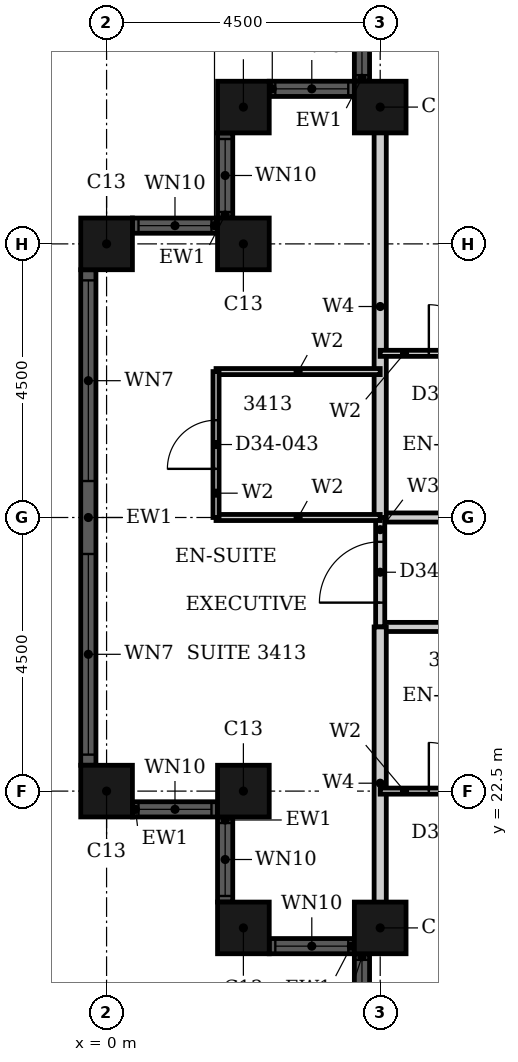
"""IFC4 building model, lengths in metres.
Left out: names, types, materials, properties, quantities, classifications, styles, units other than length and angle.
Written with IfcOpenShell. Run it as: python <this file> out.ifc"""

import sys

from ifc_helpers import new_model, si_unit, direction, frame, frame_2d, origin, origin_2d, place, context, subcontext, project, spatial, rectangle, hollow_rectangle, extrude, element, fill, save


model = new_model("IFC4")
c1 = context("Model", 3, precision=1e-05, world=origin(), true_north=direction((0.0, 1.0)))
c2 = subcontext(c1, "Body", "Model", "MODEL_VIEW")
j1 = project(units=[si_unit("LENGTHUNIT", "METRE"), si_unit("PLANEANGLEUNIT", "RADIAN")], contexts=[c1])
p1 = place(None, origin())
s1 = spatial("IfcSite", under=j1, at=p1, CompositionType="ELEMENT")
p2 = place(p1, origin())
s2 = spatial("IfcBuilding", under=s1, at=p2, CompositionType="ELEMENT")
p3 = place(p2, frame((0.0, 0.0, 136.8)))
s3 = spatial("IfcBuildingStorey", under=s2, at=p3, CompositionType="ELEMENT", Elevation=136.8)
for number, where, z_axis, x_axis in (
    (1, (4.5, 33.75, 0.0), (0.0, 0.0, 1.0), (1.0, 0.0, 0.0)),
    (2, (2.25, 33.75, 0.0), (0.0, 0.0, 1.0), (1.0, 0.0, 0.0)),
    (3, (2.25, 31.5, 0.0), (0.0, 0.0, 1.0), (1.0, 0.0, 0.0)),
    (4, (0.0, 31.5, 0.0), (0.0, 0.0, 1.0), (1.0, 0.0, 0.0)),
    (5, (0.0, 22.5, 0.0), (0.0, 0.0, 1.0), (1.0, 0.0, 0.0)),
    (6, (2.25, 22.5, 0.0), (0.0, 0.0, 1.0), (1.0, 0.0, 0.0)),
    (7, (2.25, 20.25, 0.0), (0.0, 0.0, 1.0), (1.0, 0.0, 0.0)),
    (8, (4.5, 20.25, 0.0), (0.0, 0.0, 1.0), (1.0, 0.0, 0.0)),
):
    element("IfcColumn", number, at=place(p3, frame(where, z_axis=z_axis, x_axis=x_axis)), inside=s3, PredefinedType="COLUMN", context=c2, shape_type="SweptSolid", body=[
        extrude(hollow_rectangle(XDim=0.85, YDim=0.85, WallThickness=0.026, at=origin_2d()), origin(), (0.0, 0.0, 1.0), 3.6),
    ])
p4 = place(p3, frame((4.2, 35.575, 0.0), z_axis=(0.0, 0.0, 1.0), x_axis=(0.0, -1.0, 0.0)))
e9 = element("IfcWall", 9, at=p4, inside=s3, PredefinedType="SOLIDWALL", context=c2, shape_type="SweptSolid", body=[
    extrude(rectangle(XDim=1.4, YDim=0.25, at=frame_2d((0.7, 0.0))), origin(), (0.0, 0.0, 1.0), 3.6),
])
p5 = place(p4, frame((0.1, 0.0, 0.9)))
e10 = element("IfcOpeningElement", 10, at=p5, cuts=e9, PredefinedType="OPENING", context=c2, shape_type="SweptSolid", body=[
    extrude(rectangle(XDim=1.2, YDim=1.85, at=frame_2d((0.6, 0.925))), frame((0.0, 0.135, 0.0), z_axis=(0.0, -1.0, 0.0), x_axis=(1.0, 0.0, 0.0)), (0.0, 0.0, 1.0), 0.27),
])
p6 = place(p3, frame((4.075, 34.05, 0.0), z_axis=(0.0, 0.0, 1.0), x_axis=(-1.0, 0.0, 0.0)))
e11 = element("IfcWall", 11, at=p6, inside=s3, PredefinedType="SOLIDWALL", context=c2, shape_type="SweptSolid", body=[
    extrude(rectangle(XDim=1.4, YDim=0.25, at=frame_2d((0.7, 0.0))), origin(), (0.0, 0.0, 1.0), 3.6),
])
p7 = place(p6, frame((0.1, 0.0, 0.9)))
e12 = element("IfcOpeningElement", 12, at=p7, cuts=e11, PredefinedType="OPENING", context=c2, shape_type="SweptSolid", body=[
    extrude(rectangle(XDim=1.2, YDim=1.85, at=frame_2d((0.6, 0.925))), frame((0.0, 0.135, 0.0), z_axis=(0.0, -1.0, 0.0), x_axis=(1.0, 0.0, 0.0)), (0.0, 0.0, 1.0), 0.27),
])
p8 = place(p3, frame((1.95, 33.325, 0.0), z_axis=(0.0, 0.0, 1.0), x_axis=(0.0, -1.0, 0.0)))
e13 = element("IfcWall", 13, at=p8, inside=s3, PredefinedType="SOLIDWALL", context=c2, shape_type="SweptSolid", body=[
    extrude(rectangle(XDim=1.4, YDim=0.25, at=frame_2d((0.7, 0.0))), origin(), (0.0, 0.0, 1.0), 3.6),
])
p9 = place(p8, frame((0.1, 0.0, 0.9)))
e14 = element("IfcOpeningElement", 14, at=p9, cuts=e13, PredefinedType="OPENING", context=c2, shape_type="SweptSolid", body=[
    extrude(rectangle(XDim=1.2, YDim=1.85, at=frame_2d((0.6, 0.925))), frame((0.0, 0.135, 0.0), z_axis=(0.0, -1.0, 0.0), x_axis=(1.0, 0.0, 0.0)), (0.0, 0.0, 1.0), 0.27),
])
p10 = place(p3, frame((1.825, 31.8, 0.0), z_axis=(0.0, 0.0, 1.0), x_axis=(-1.0, 0.0, 0.0)))
e15 = element("IfcWall", 15, at=p10, inside=s3, PredefinedType="SOLIDWALL", context=c2, shape_type="SweptSolid", body=[
    extrude(rectangle(XDim=1.4, YDim=0.25, at=frame_2d((0.7, 0.0))), origin(), (0.0, 0.0, 1.0), 3.6),
])
p11 = place(p10, frame((0.1, 0.0, 0.9)))
e16 = element("IfcOpeningElement", 16, at=p11, cuts=e15, PredefinedType="OPENING", context=c2, shape_type="SweptSolid", body=[
    extrude(rectangle(XDim=1.2, YDim=1.85, at=frame_2d((0.6, 0.925))), frame((0.0, 0.135, 0.0), z_axis=(0.0, -1.0, 0.0), x_axis=(1.0, 0.0, 0.0)), (0.0, 0.0, 1.0), 0.27),
])
p12 = place(p3, frame((-0.3, 31.075, 0.0), z_axis=(0.0, 0.0, 1.0), x_axis=(0.0, -1.0, 0.0)))
e17 = element("IfcWall", 17, at=p12, inside=s3, PredefinedType="SOLIDWALL", context=c2, shape_type="SweptSolid", body=[
    extrude(rectangle(XDim=8.15, YDim=0.25, at=frame_2d((4.075, 0.0))), origin(), (0.0, 0.0, 1.0), 3.6),
])
p13 = place(p12, frame((0.175, 0.0, 0.9)))
e18 = element("IfcOpeningElement", 18, at=p13, cuts=e17, PredefinedType="OPENING", context=c2, shape_type="SweptSolid", body=[
    extrude(rectangle(XDim=3.3, YDim=1.85, at=frame_2d((1.65, 0.925))), frame((0.0, 0.135, 0.0), z_axis=(0.0, -1.0, 0.0), x_axis=(1.0, 0.0, 0.0)), (0.0, 0.0, 1.0), 0.27),
])
p14 = place(p12, frame((4.675, 0.0, 0.9)))
e19 = element("IfcOpeningElement", 19, at=p14, cuts=e17, PredefinedType="OPENING", context=c2, shape_type="SweptSolid", body=[
    extrude(rectangle(XDim=3.3, YDim=1.85, at=frame_2d((1.65, 0.925))), frame((0.0, 0.135, 0.0), z_axis=(0.0, -1.0, 0.0), x_axis=(1.0, 0.0, 0.0)), (0.0, 0.0, 1.0), 0.27),
])
p15 = place(p3, frame((0.425, 22.2, 0.0), z_axis=(0.0, 0.0, 1.0), x_axis=(1.0, 0.0, 0.0)))
e20 = element("IfcWall", 20, at=p15, inside=s3, PredefinedType="SOLIDWALL", context=c2, shape_type="SweptSolid", body=[
    extrude(rectangle(XDim=1.4, YDim=0.25, at=frame_2d((0.7, 0.0))), origin(), (0.0, 0.0, 1.0), 3.6),
])
p16 = place(p15, frame((0.1, 0.0, 0.9)))
e21 = element("IfcOpeningElement", 21, at=p16, cuts=e20, PredefinedType="OPENING", context=c2, shape_type="SweptSolid", body=[
    extrude(rectangle(XDim=1.2, YDim=1.85, at=frame_2d((0.6, 0.925))), frame((0.0, 0.135, 0.0), z_axis=(0.0, -1.0, 0.0), x_axis=(1.0, 0.0, 0.0)), (0.0, 0.0, 1.0), 0.27),
])
p17 = place(p3, frame((1.95, 22.075, 0.0), z_axis=(0.0, 0.0, 1.0), x_axis=(0.0, -1.0, 0.0)))
e22 = element("IfcWall", 22, at=p17, inside=s3, PredefinedType="SOLIDWALL", context=c2, shape_type="SweptSolid", body=[
    extrude(rectangle(XDim=1.4, YDim=0.25, at=frame_2d((0.7, 0.0))), origin(), (0.0, 0.0, 1.0), 3.6),
])
p18 = place(p17, frame((0.1, 0.0, 0.9)))
e23 = element("IfcOpeningElement", 23, at=p18, cuts=e22, PredefinedType="OPENING", context=c2, shape_type="SweptSolid", body=[
    extrude(rectangle(XDim=1.2, YDim=1.85, at=frame_2d((0.6, 0.925))), frame((0.0, 0.135, 0.0), z_axis=(0.0, -1.0, 0.0), x_axis=(1.0, 0.0, 0.0)), (0.0, 0.0, 1.0), 0.27),
])
p19 = place(p3, frame((2.675, 19.95, 0.0), z_axis=(0.0, 0.0, 1.0), x_axis=(1.0, 0.0, 0.0)))
e24 = element("IfcWall", 24, at=p19, inside=s3, PredefinedType="SOLIDWALL", context=c2, shape_type="SweptSolid", body=[
    extrude(rectangle(XDim=1.4, YDim=0.25, at=frame_2d((0.7, 0.0))), origin(), (0.0, 0.0, 1.0), 3.6),
])
p20 = place(p19, frame((0.1, 0.0, 0.9)))
e25 = element("IfcOpeningElement", 25, at=p20, cuts=e24, PredefinedType="OPENING", context=c2, shape_type="SweptSolid", body=[
    extrude(rectangle(XDim=1.2, YDim=1.85, at=frame_2d((0.6, 0.925))), frame((0.0, 0.135, 0.0), z_axis=(0.0, -1.0, 0.0), x_axis=(1.0, 0.0, 0.0)), (0.0, 0.0, 1.0), 0.27),
])
p21 = place(p3, frame((4.2, 19.825, 0.0), z_axis=(0.0, 0.0, 1.0), x_axis=(0.0, -1.0, 0.0)))
e26 = element("IfcWall", 26, at=p21, inside=s3, PredefinedType="SOLIDWALL", context=c2, shape_type="SweptSolid", body=[
    extrude(rectangle(XDim=1.4, YDim=0.25, at=frame_2d((0.7, 0.0))), origin(), (0.0, 0.0, 1.0), 3.6),
])
p22 = place(p21, frame((0.1, 0.0, 0.9)))
e27 = element("IfcOpeningElement", 27, at=p22, cuts=e26, PredefinedType="OPENING", context=c2, shape_type="SweptSolid", body=[
    extrude(rectangle(XDim=1.2, YDim=1.85, at=frame_2d((0.6, 0.925))), frame((0.0, 0.135, 0.0), z_axis=(0.0, -1.0, 0.0), x_axis=(1.0, 0.0, 0.0)), (0.0, 0.0, 1.0), 0.27),
])
p23 = place(p3, frame((4.5, 25.2, 0.0), z_axis=(0.0, 0.0, 1.0), x_axis=(1.0, 0.0, 0.0)))
e28 = element("IfcWall", 28, at=p23, inside=s3, PredefinedType="PARTITIONING", context=c2, shape_type="SweptSolid", body=[
    extrude(rectangle(XDim=11.7, YDim=0.15, at=frame_2d((5.85, 0.0))), origin(), (0.0, 0.0, 1.0), 3.2),
])
p24 = place(p23, frame((7.45, 0.0, 0.0)))
e29 = element("IfcOpeningElement", 29, at=p24, cuts=e28, PredefinedType="OPENING", context=c2, shape_type="SweptSolid", body=[
    extrude(rectangle(XDim=1.0, YDim=2.1, at=frame_2d((0.5, 1.05))), frame((0.0, 0.085, 0.0), z_axis=(0.0, -1.0, 0.0), x_axis=(1.0, 0.0, 0.0)), (0.0, 0.0, 1.0), 0.17),
])
p25 = place(p23, frame((2.95, 0.0, 0.0)))
e30 = element("IfcOpeningElement", 30, at=p25, cuts=e28, PredefinedType="OPENING", context=c2, shape_type="SweptSolid", body=[
    extrude(rectangle(XDim=1.0, YDim=2.1, at=frame_2d((0.5, 1.05))), frame((0.0, 0.085, 0.0), z_axis=(0.0, -1.0, 0.0), x_axis=(1.0, 0.0, 0.0)), (0.0, 0.0, 1.0), 0.17),
])
p26 = place(p3, frame((4.5, 27.0, 0.0), z_axis=(0.0, 0.0, 1.0), x_axis=(1.0, 0.0, 0.0)))
e31 = element("IfcWall", 31, at=p26, inside=s3, PredefinedType="PARTITIONING", context=c2, shape_type="SweptSolid", body=[
    extrude(rectangle(XDim=11.7, YDim=0.15, at=frame_2d((5.85, 0.0))), origin(), (0.0, 0.0, 1.0), 2.48),
])
p27 = place(p26, frame((6.25, 0.0, 0.0)))
e32 = element("IfcOpeningElement", 32, at=p27, cuts=e31, PredefinedType="OPENING", context=c2, shape_type="SweptSolid", body=[
    extrude(rectangle(XDim=1.0, YDim=2.1, at=frame_2d((0.5, 1.05))), frame((0.0, 0.085, 0.0), z_axis=(0.0, -1.0, 0.0), x_axis=(1.0, 0.0, 0.0)), (0.0, 0.0, 1.0), 0.17),
])
p28 = place(p3, frame((4.5, 25.2, 0.0), z_axis=(0.0, 0.0, 1.0), x_axis=(0.0, 1.0, 0.0)))
e33 = element("IfcWall", 33, at=p28, inside=s3, PredefinedType="PARTITIONING", context=c2, shape_type="SweptSolid", body=[
    extrude(rectangle(XDim=1.8, YDim=0.15, at=frame_2d((0.9, 0.0))), origin(), (0.0, 0.0, 1.0), 3.2),
])
p29 = place(p28, frame((0.4, 0.0, 0.0)))
e34 = element("IfcOpeningElement", 34, at=p29, cuts=e33, PredefinedType="OPENING", context=c2, shape_type="SweptSolid", body=[
    extrude(rectangle(XDim=1.0, YDim=2.1, at=frame_2d((0.5, 1.05))), frame((0.0, 0.085, 0.0), z_axis=(0.0, -1.0, 0.0), x_axis=(1.0, 0.0, 0.0)), (0.0, 0.0, 1.0), 0.17),
])
p30 = place(p3, frame((4.5, 20.06, 0.0), z_axis=(0.0, 0.0, 1.0), x_axis=(0.0, 1.0, 0.0)))
e35 = element("IfcWall", 35, at=p30, inside=s3, PredefinedType="PARTITIONING", context=c2, shape_type="SweptSolid", body=[
    extrude(rectangle(XDim=5.14, YDim=0.2, at=frame_2d((2.57, 0.0))), origin(), (0.0, 0.0, 1.0), 3.2),
])
p31 = place(p3, frame((4.5, 27.0, 0.0), z_axis=(0.0, 0.0, 1.0), x_axis=(0.0, 1.0, 0.0)))
e36 = element("IfcWall", 36, at=p31, inside=s3, PredefinedType="PARTITIONING", context=c2, shape_type="SweptSolid", body=[
    extrude(rectangle(XDim=6.94, YDim=0.2, at=frame_2d((3.47, 0.0))), origin(), (0.0, 0.0, 1.0), 3.2),
])
p32 = place(p3, frame((4.5, 22.5, 0.0), z_axis=(0.0, 0.0, 1.0), x_axis=(1.0, 0.0, 0.0)))
e37 = element("IfcWall", 37, at=p32, inside=s3, PredefinedType="PARTITIONING", context=c2, shape_type="SweptSolid", body=[
    extrude(rectangle(XDim=2.4, YDim=0.1, at=frame_2d((1.2, 0.0))), origin(), (0.0, 0.0, 1.0), 2.48),
])
p33 = place(p32, frame((0.8, 0.0, 0.0)))
e38 = element("IfcOpeningElement", 38, at=p33, cuts=e37, PredefinedType="OPENING", context=c2, shape_type="SweptSolid", body=[
    extrude(rectangle(XDim=0.8, YDim=2.1, at=frame_2d((0.4, 1.05))), frame((0.0, 0.06, 0.0), z_axis=(0.0, -1.0, 0.0), x_axis=(1.0, 0.0, 0.0)), (0.0, 0.0, 1.0), 0.12),
])
p34 = place(p3, frame((1.8, 27.0, 0.0), z_axis=(0.0, 0.0, 1.0), x_axis=(1.0, 0.0, 0.0)))
e39 = element("IfcWall", 39, at=p34, inside=s3, PredefinedType="PARTITIONING", context=c2, shape_type="SweptSolid", body=[
    extrude(rectangle(XDim=2.7, YDim=0.1, at=frame_2d((1.35, 0.0))), origin(), (0.0, 0.0, 1.0), 2.48),
])
p35 = place(p3, frame((1.8, 29.4, 0.0), z_axis=(0.0, 0.0, 1.0), x_axis=(1.0, 0.0, 0.0)))
e40 = element("IfcWall", 40, at=p35, inside=s3, PredefinedType="PARTITIONING", context=c2, shape_type="SweptSolid", body=[
    extrude(rectangle(XDim=2.7, YDim=0.1, at=frame_2d((1.35, 0.0))), origin(), (0.0, 0.0, 1.0), 3.2),
])
p36 = place(p3, frame((4.5, 29.7, 0.0), z_axis=(0.0, 0.0, 1.0), x_axis=(1.0, 0.0, 0.0)))
e41 = element("IfcWall", 41, at=p36, inside=s3, PredefinedType="PARTITIONING", context=c2, shape_type="SweptSolid", body=[
    extrude(rectangle(XDim=2.4, YDim=0.1, at=frame_2d((1.2, 0.0))), origin(), (0.0, 0.0, 1.0), 3.2),
])
p37 = place(p36, frame((0.8, 0.0, 0.0)))
e42 = element("IfcOpeningElement", 42, at=p37, cuts=e41, PredefinedType="OPENING", context=c2, shape_type="SweptSolid", body=[
    extrude(rectangle(XDim=0.8, YDim=2.1, at=frame_2d((0.4, 1.05))), frame((0.0, 0.06, 0.0), z_axis=(0.0, -1.0, 0.0), x_axis=(1.0, 0.0, 0.0)), (0.0, 0.0, 1.0), 0.12),
])
p38 = place(p3, frame((1.8, 27.0, 0.0), z_axis=(0.0, 0.0, 1.0), x_axis=(0.0, 1.0, 0.0)))
e43 = element("IfcWall", 43, at=p38, inside=s3, PredefinedType="PARTITIONING", context=c2, shape_type="SweptSolid", body=[
    extrude(rectangle(XDim=2.4, YDim=0.1, at=frame_2d((1.2, 0.0))), origin(), (0.0, 0.0, 1.0), 3.2),
])
p39 = place(p38, frame((0.8, 0.0, 0.0)))
e44 = element("IfcOpeningElement", 44, at=p39, cuts=e43, PredefinedType="OPENING", context=c2, shape_type="SweptSolid", body=[
    extrude(rectangle(XDim=0.8, YDim=2.1, at=frame_2d((0.4, 1.05))), frame((0.0, 0.06, 0.0), z_axis=(0.0, -1.0, 0.0), x_axis=(1.0, 0.0, 0.0)), (0.0, 0.0, 1.0), 0.12),
])
p40 = place(p5, origin())
e45 = element("IfcWindow", 45, at=p40, inside=s3, PartitioningType="SINGLE_PANEL", PredefinedType="WINDOW", context=c2, shape_type="SweptSolid", body=[
    extrude(rectangle(XDim=1.2, YDim=1.85, at=frame_2d((0.6, 0.925))), frame((0.0, 0.03, 0.0), z_axis=(0.0, -1.0, 0.0), x_axis=(1.0, 0.0, 0.0)), (0.0, 0.0, 1.0), 0.06),
])
fill(e10, e45)
p41 = place(p7, origin())
e46 = element("IfcWindow", 46, at=p41, inside=s3, PartitioningType="SINGLE_PANEL", PredefinedType="WINDOW", context=c2, shape_type="SweptSolid", body=[
    extrude(rectangle(XDim=1.2, YDim=1.85, at=frame_2d((0.6, 0.925))), frame((0.0, 0.03, 0.0), z_axis=(0.0, -1.0, 0.0), x_axis=(1.0, 0.0, 0.0)), (0.0, 0.0, 1.0), 0.06),
])
fill(e12, e46)
p42 = place(p9, origin())
e47 = element("IfcWindow", 47, at=p42, inside=s3, PartitioningType="SINGLE_PANEL", PredefinedType="WINDOW", context=c2, shape_type="SweptSolid", body=[
    extrude(rectangle(XDim=1.2, YDim=1.85, at=frame_2d((0.6, 0.925))), frame((0.0, 0.03, 0.0), z_axis=(0.0, -1.0, 0.0), x_axis=(1.0, 0.0, 0.0)), (0.0, 0.0, 1.0), 0.06),
])
fill(e14, e47)
p43 = place(p11, origin())
e48 = element("IfcWindow", 48, at=p43, inside=s3, PartitioningType="SINGLE_PANEL", PredefinedType="WINDOW", context=c2, shape_type="SweptSolid", body=[
    extrude(rectangle(XDim=1.2, YDim=1.85, at=frame_2d((0.6, 0.925))), frame((0.0, 0.03, 0.0), z_axis=(0.0, -1.0, 0.0), x_axis=(1.0, 0.0, 0.0)), (0.0, 0.0, 1.0), 0.06),
])
fill(e16, e48)
p44 = place(p13, origin())
e49 = element("IfcWindow", 49, at=p44, inside=s3, PartitioningType="SINGLE_PANEL", PredefinedType="WINDOW", context=c2, shape_type="SweptSolid", body=[
    extrude(rectangle(XDim=3.3, YDim=1.85, at=frame_2d((1.65, 0.925))), frame((0.0, 0.03, 0.0), z_axis=(0.0, -1.0, 0.0), x_axis=(1.0, 0.0, 0.0)), (0.0, 0.0, 1.0), 0.06),
])
fill(e18, e49)
p45 = place(p14, origin())
e50 = element("IfcWindow", 50, at=p45, inside=s3, PartitioningType="SINGLE_PANEL", PredefinedType="WINDOW", context=c2, shape_type="SweptSolid", body=[
    extrude(rectangle(XDim=3.3, YDim=1.85, at=frame_2d((1.65, 0.925))), frame((0.0, 0.03, 0.0), z_axis=(0.0, -1.0, 0.0), x_axis=(1.0, 0.0, 0.0)), (0.0, 0.0, 1.0), 0.06),
])
fill(e19, e50)
p46 = place(p16, origin())
e51 = element("IfcWindow", 51, at=p46, inside=s3, PartitioningType="SINGLE_PANEL", PredefinedType="WINDOW", context=c2, shape_type="SweptSolid", body=[
    extrude(rectangle(XDim=1.2, YDim=1.85, at=frame_2d((0.6, 0.925))), frame((0.0, 0.03, 0.0), z_axis=(0.0, -1.0, 0.0), x_axis=(1.0, 0.0, 0.0)), (0.0, 0.0, 1.0), 0.06),
])
fill(e21, e51)
p47 = place(p18, origin())
e52 = element("IfcWindow", 52, at=p47, inside=s3, PartitioningType="SINGLE_PANEL", PredefinedType="WINDOW", context=c2, shape_type="SweptSolid", body=[
    extrude(rectangle(XDim=1.2, YDim=1.85, at=frame_2d((0.6, 0.925))), frame((0.0, 0.03, 0.0), z_axis=(0.0, -1.0, 0.0), x_axis=(1.0, 0.0, 0.0)), (0.0, 0.0, 1.0), 0.06),
])
fill(e23, e52)
p48 = place(p20, origin())
e53 = element("IfcWindow", 53, at=p48, inside=s3, PartitioningType="SINGLE_PANEL", PredefinedType="WINDOW", context=c2, shape_type="SweptSolid", body=[
    extrude(rectangle(XDim=1.2, YDim=1.85, at=frame_2d((0.6, 0.925))), frame((0.0, 0.03, 0.0), z_axis=(0.0, -1.0, 0.0), x_axis=(1.0, 0.0, 0.0)), (0.0, 0.0, 1.0), 0.06),
])
fill(e25, e53)
p49 = place(p22, origin())
e54 = element("IfcWindow", 54, at=p49, inside=s3, PartitioningType="SINGLE_PANEL", PredefinedType="WINDOW", context=c2, shape_type="SweptSolid", body=[
    extrude(rectangle(XDim=1.2, YDim=1.85, at=frame_2d((0.6, 0.925))), frame((0.0, 0.03, 0.0), z_axis=(0.0, -1.0, 0.0), x_axis=(1.0, 0.0, 0.0)), (0.0, 0.0, 1.0), 0.06),
])
fill(e27, e54)
p50 = place(p33, origin())
e55 = element("IfcDoor", 55, at=p50, inside=s3, OperationType="SINGLE_SWING_LEFT", PredefinedType="DOOR", context=c2, shape_type="SweptSolid", body=[
    extrude(rectangle(XDim=0.8, YDim=2.1, at=frame_2d((0.4, 1.05))), frame((0.0, 0.025, 0.0), z_axis=(0.0, -1.0, 0.0), x_axis=(1.0, 0.0, 0.0)), (0.0, 0.0, 1.0), 0.05),
])
fill(e38, e55)
p51 = place(p37, origin())
e56 = element("IfcDoor", 56, at=p51, inside=s3, OperationType="SINGLE_SWING_RIGHT", PredefinedType="DOOR", context=c2, shape_type="SweptSolid", body=[
    extrude(rectangle(XDim=0.8, YDim=2.1, at=frame_2d((0.4, 1.05))), frame((0.0, 0.025, 0.0), z_axis=(0.0, -1.0, 0.0), x_axis=(1.0, 0.0, 0.0)), (0.0, 0.0, 1.0), 0.05),
])
fill(e42, e56)
p52 = place(p29, origin())
e57 = element("IfcDoor", 57, at=p52, inside=s3, OperationType="SINGLE_SWING_RIGHT", PredefinedType="DOOR", context=c2, shape_type="SweptSolid", body=[
    extrude(rectangle(XDim=1.0, YDim=2.1, at=frame_2d((0.5, 1.05))), frame((0.0, 0.025, 0.0), z_axis=(0.0, -1.0, 0.0), x_axis=(1.0, 0.0, 0.0)), (0.0, 0.0, 1.0), 0.05),
])
fill(e34, e57)
p53 = place(p39, origin())
e58 = element("IfcDoor", 58, at=p53, inside=s3, OperationType="SINGLE_SWING_LEFT", PredefinedType="DOOR", context=c2, shape_type="SweptSolid", body=[
    extrude(rectangle(XDim=0.8, YDim=2.1, at=frame_2d((0.4, 1.05))), frame((0.0, 0.025, 0.0), z_axis=(0.0, -1.0, 0.0), x_axis=(1.0, 0.0, 0.0)), (0.0, 0.0, 1.0), 0.05),
])
fill(e44, e58)
save(model, sys.argv[1])
